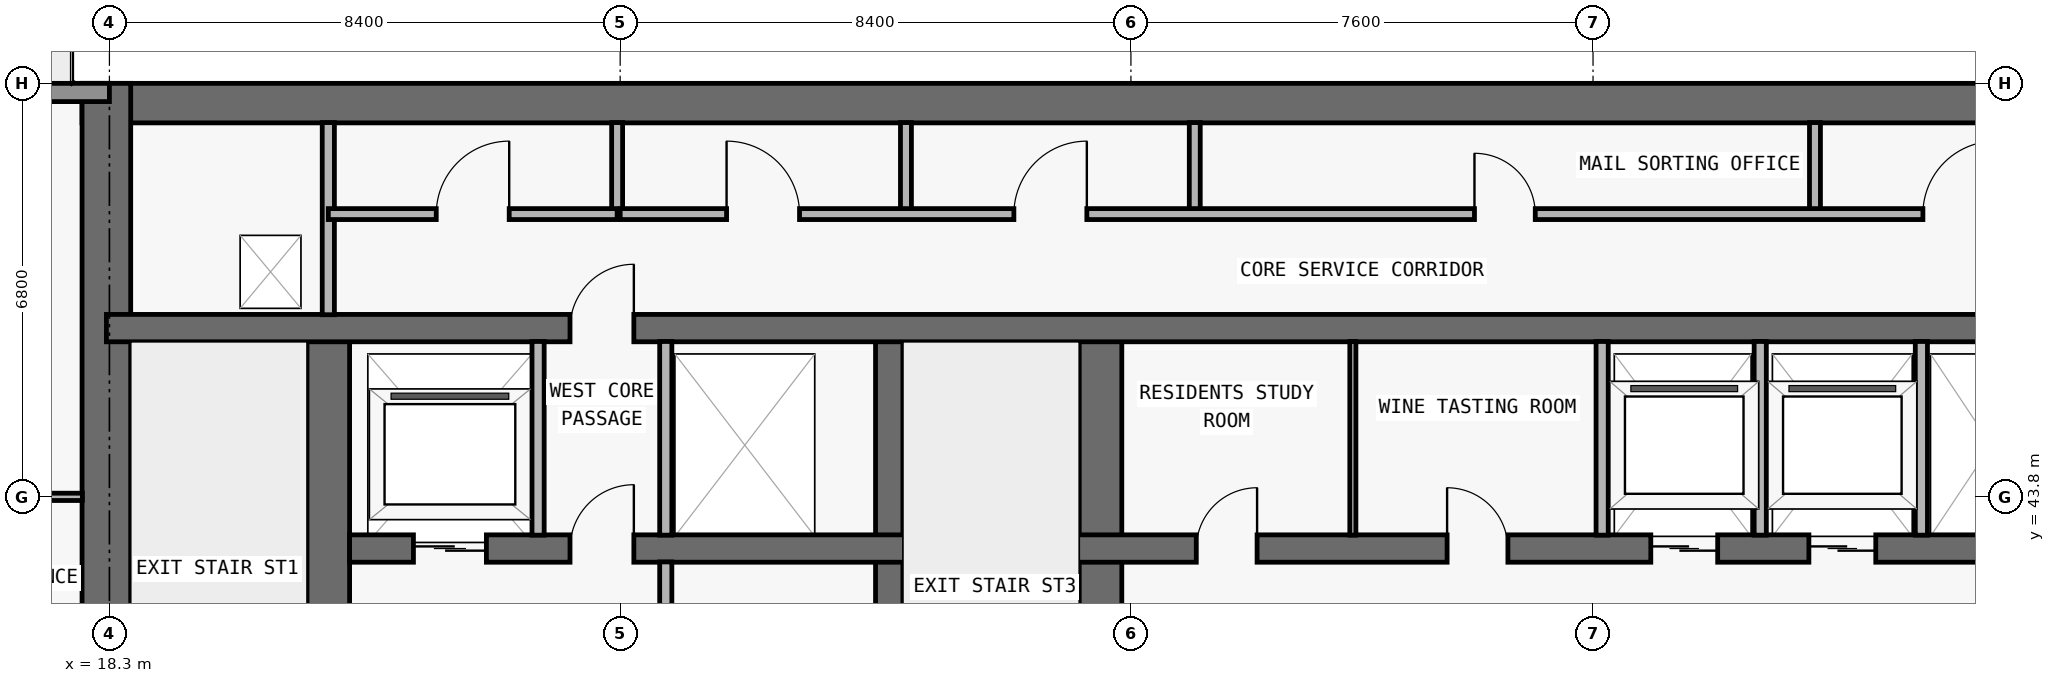
"""IFC4 building model, lengths in metres.
Left out: names, types, materials, properties, quantities, classifications, styles, units other than length and angle.
Written with IfcOpenShell. Run it as: python <this file> out.ifc"""

import sys

from ifc_helpers import new_model, si_unit, direction, frame, frame_2d, origin, place, context, subcontext, project, spatial, rectangle, extrude, element, fill, save


model = new_model("IFC4")
c1 = context("Model", 3, precision=1e-05, world=origin(), true_north=direction((0.0, 1.0)))
c2 = subcontext(c1, "Body", "Model", "MODEL_VIEW")
j1 = project(units=[si_unit("LENGTHUNIT", "METRE"), si_unit("PLANEANGLEUNIT", "RADIAN")], contexts=[c1])
p1 = place(None, origin())
s1 = spatial("IfcSite", under=j1, at=p1, CompositionType="ELEMENT")
p2 = place(p1, origin())
s2 = spatial("IfcBuilding", under=s1, at=p2, CompositionType="ELEMENT")
p3 = place(p2, frame((0.0, 0.0, 145.5)))
s3 = spatial("IfcBuildingStorey", under=s2, at=p3, CompositionType="ELEMENT", Elevation=145.5)
p4 = place(p3, frame((17.85, 50.275, 0.0), z_axis=(0.0, 0.0, 1.0), x_axis=(1.0, 0.0, 0.0)))
e1 = element("IfcWall", 1, at=p4, inside=s3, PredefinedType="SHEAR", context=c2, shape_type="SweptSolid", body=[
    extrude(rectangle(XDim=42.1, YDim=0.65, at=frame_2d((21.05, 0.0))), origin(), (0.0, 0.0, 1.0), 3.05),
])
p5 = place(p3, frame((18.25, 36.55, 0.0), z_axis=(0.0, 0.0, 1.0), x_axis=(0.0, 1.0, 0.0)))
e2 = element("IfcWall", 2, at=p5, inside=s3, PredefinedType="SHEAR", context=c2, shape_type="SweptSolid", body=[
    extrude(rectangle(XDim=14.05, YDim=0.8, at=frame_2d((7.025, 0.0))), origin(), (0.0, 0.0, 1.0), 3.05),
])
p6 = place(p3, frame((21.9, 36.95, 0.0), z_axis=(0.0, 0.0, 1.0), x_axis=(0.0, 1.0, 0.0)))
e3 = element("IfcWall", 3, at=p6, inside=s3, PredefinedType="SHEAR", context=c2, shape_type="SweptSolid", body=[
    extrude(rectangle(XDim=9.625, YDim=0.7, at=frame_2d((4.812, 0.0))), origin(), (0.0, 0.0, 1.0), 3.05),
])
p7 = place(p6, frame((0.6, 0.0, 0.0)))
e4 = element("IfcOpeningElement", 4, at=p7, cuts=e3, PredefinedType="OPENING", context=c2, shape_type="SweptSolid", body=[
    extrude(rectangle(XDim=1.1, YDim=2.15, at=frame_2d((0.55, 1.075))), frame((0.0, 0.36, 0.0), z_axis=(0.0, -1.0, 0.0), x_axis=(1.0, 0.0, 0.0)), (0.0, 0.0, 1.0), 0.72),
])
p8 = place(p3, frame((31.125, 36.95, 0.0), z_axis=(0.0, 0.0, 1.0), x_axis=(0.0, 1.0, 0.0)))
e5 = element("IfcWall", 5, at=p8, inside=s3, PredefinedType="SHEAR", context=c2, shape_type="SweptSolid", body=[
    extrude(rectangle(XDim=9.625, YDim=0.45, at=frame_2d((4.812, 0.0))), origin(), (0.0, 0.0, 1.0), 3.05),
])
p9 = place(p3, frame((34.6, 36.95, 0.0), z_axis=(0.0, 0.0, 1.0), x_axis=(0.0, 1.0, 0.0)))
e6 = element("IfcWall", 6, at=p9, inside=s3, PredefinedType="SHEAR", context=c2, shape_type="SweptSolid", body=[
    extrude(rectangle(XDim=9.625, YDim=0.7, at=frame_2d((4.812, 0.0))), origin(), (0.0, 0.0, 1.0), 3.05),
])
p10 = place(p3, frame((22.25, 42.95, 0.0), z_axis=(0.0, 0.0, 1.0), x_axis=(1.0, 0.0, 0.0)))
e7 = element("IfcWall", 7, at=p10, inside=s3, PredefinedType="SHEAR", context=c2, shape_type="SweptSolid", body=[
    extrude(rectangle(XDim=33.3, YDim=0.45, at=frame_2d((16.65, 0.0))), origin(), (0.0, 0.0, 1.0), 3.05),
])
p11 = place(p10, frame((1.05, 0.0, 0.0)))
e8 = element("IfcOpeningElement", 8, at=p11, cuts=e7, PredefinedType="OPENING", context=c2, shape_type="SweptSolid", body=[
    extrude(rectangle(XDim=1.2, YDim=2.2, at=frame_2d((0.6, 1.1))), frame((0.0, 0.235, 0.0), z_axis=(0.0, -1.0, 0.0), x_axis=(1.0, 0.0, 0.0)), (0.0, 0.0, 1.0), 0.47),
])
p12 = place(p10, frame((31.05, 0.0, 0.0)))
e9 = element("IfcOpeningElement", 9, at=p12, cuts=e7, PredefinedType="OPENING", context=c2, shape_type="SweptSolid", body=[
    extrude(rectangle(XDim=1.2, YDim=2.2, at=frame_2d((0.6, 1.1))), frame((0.0, 0.235, 0.0), z_axis=(0.0, -1.0, 0.0), x_axis=(1.0, 0.0, 0.0)), (0.0, 0.0, 1.0), 0.47),
])
p13 = place(p10, frame((21.4, 0.0, 0.0)))
e10 = element("IfcOpeningElement", 10, at=p13, cuts=e7, PredefinedType="OPENING", context=c2, shape_type="SweptSolid", body=[
    extrude(rectangle(XDim=1.1, YDim=2.2, at=frame_2d((0.55, 1.1))), frame((0.0, 0.235, 0.0), z_axis=(0.0, -1.0, 0.0), x_axis=(1.0, 0.0, 0.0)), (0.0, 0.0, 1.0), 0.47),
])
p14 = place(p10, frame((24.0, 0.0, 0.0)))
e11 = element("IfcOpeningElement", 11, at=p14, cuts=e7, PredefinedType="OPENING", context=c2, shape_type="SweptSolid", body=[
    extrude(rectangle(XDim=1.1, YDim=2.2, at=frame_2d((0.55, 1.1))), frame((0.0, 0.235, 0.0), z_axis=(0.0, -1.0, 0.0), x_axis=(1.0, 0.0, 0.0)), (0.0, 0.0, 1.0), 0.47),
])
p15 = place(p10, frame((3.625, 0.0, 0.0)))
e12 = element("IfcOpeningElement", 12, at=p15, cuts=e7, PredefinedType="OPENING", context=c2, shape_type="SweptSolid", body=[
    extrude(rectangle(XDim=1.05, YDim=2.15, at=frame_2d((0.525, 1.075))), frame((0.0, 0.235, 0.0), z_axis=(0.0, -1.0, 0.0), x_axis=(1.0, 0.0, 0.0)), (0.0, 0.0, 1.0), 0.47),
])
p16 = place(p10, frame((28.675, 0.0, 0.0)))
e13 = element("IfcOpeningElement", 13, at=p16, cuts=e7, PredefinedType="OPENING", context=c2, shape_type="SweptSolid", body=[
    extrude(rectangle(XDim=1.05, YDim=2.15, at=frame_2d((0.525, 1.075))), frame((0.0, 0.235, 0.0), z_axis=(0.0, -1.0, 0.0), x_axis=(1.0, 0.0, 0.0)), (0.0, 0.0, 1.0), 0.47),
])
p17 = place(p10, frame((13.925, 0.0, 0.0)))
e14 = element("IfcOpeningElement", 14, at=p17, cuts=e7, PredefinedType="OPENING", context=c2, shape_type="SweptSolid", body=[
    extrude(rectangle(XDim=1.0, YDim=2.2, at=frame_2d((0.5, 1.1))), frame((0.0, 0.235, 0.0), z_axis=(0.0, -1.0, 0.0), x_axis=(1.0, 0.0, 0.0)), (0.0, 0.0, 1.0), 0.47),
])
p18 = place(p10, frame((18.05, 0.0, 0.0)))
e15 = element("IfcOpeningElement", 15, at=p18, cuts=e7, PredefinedType="OPENING", context=c2, shape_type="SweptSolid", body=[
    extrude(rectangle(XDim=1.0, YDim=2.2, at=frame_2d((0.5, 1.1))), frame((0.0, 0.235, 0.0), z_axis=(0.0, -1.0, 0.0), x_axis=(1.0, 0.0, 0.0)), (0.0, 0.0, 1.0), 0.47),
])
p19 = place(p3, frame((18.25, 46.575, 0.0), z_axis=(0.0, 0.0, 1.0), x_axis=(1.0, 0.0, 0.0)))
e16 = element("IfcWall", 16, at=p19, inside=s3, PredefinedType="SHEAR", context=c2, shape_type="SweptSolid", body=[
    extrude(rectangle(XDim=41.3, YDim=0.45, at=frame_2d((20.65, 0.0))), origin(), (0.0, 0.0, 1.0), 3.05),
])
p20 = place(p19, frame((7.625, 0.0, 0.0)))
e17 = element("IfcOpeningElement", 17, at=p20, cuts=e16, PredefinedType="OPENING", context=c2, shape_type="SweptSolid", body=[
    extrude(rectangle(XDim=1.05, YDim=2.15, at=frame_2d((0.525, 1.075))), frame((0.0, 0.235, 0.0), z_axis=(0.0, -1.0, 0.0), x_axis=(1.0, 0.0, 0.0)), (0.0, 0.0, 1.0), 0.47),
])
p21 = place(p19, frame((32.675, 0.0, 0.0)))
e18 = element("IfcOpeningElement", 18, at=p21, cuts=e16, PredefinedType="OPENING", context=c2, shape_type="SweptSolid", body=[
    extrude(rectangle(XDim=1.05, YDim=2.15, at=frame_2d((0.525, 1.075))), frame((0.0, 0.235, 0.0), z_axis=(0.0, -1.0, 0.0), x_axis=(1.0, 0.0, 0.0)), (0.0, 0.0, 1.0), 0.47),
])
p22 = place(p3, frame((7.7, 50.45, 0.0), z_axis=(0.0, 0.0, 1.0), x_axis=(1.0, 0.0, 0.0)))
e19 = element("IfcWall", 19, at=p22, inside=s3, PredefinedType="STANDARD", context=c2, shape_type="SweptSolid", body=[
    extrude(rectangle(XDim=10.6, YDim=0.3, at=frame_2d((5.3, 0.0))), origin(), (0.0, 0.0, 1.0), 3.05),
])
p23 = place(p22, frame((4.3, 0.0, 0.0)))
e20 = element("IfcOpeningElement", 20, at=p23, cuts=e19, PredefinedType="OPENING", context=c2, shape_type="SweptSolid", body=[
    extrude(rectangle(XDim=2.0, YDim=2.3, at=frame_2d((1.0, 1.15))), frame((0.0, 0.16, 0.0), z_axis=(0.0, -1.0, 0.0), x_axis=(1.0, 0.0, 0.0)), (0.0, 0.0, 1.0), 0.32),
])
p24 = place(p3, frame((21.9, 46.795, 0.0), z_axis=(0.0, 0.0, 1.0), x_axis=(0.0, 1.0, 0.0)))
e21 = element("IfcWall", 21, at=p24, inside=s3, PredefinedType="PARTITIONING", context=c2, shape_type="SweptSolid", body=[
    extrude(rectangle(XDim=3.16, YDim=0.2, at=frame_2d((1.58, 0.0))), origin(), (0.0, 0.0, 1.0), 3.05),
])
p25 = place(p3, frame((25.35, 43.17, 0.0), z_axis=(0.0, 0.0, 1.0), x_axis=(0.0, 1.0, 0.0)))
e22 = element("IfcWall", 22, at=p25, inside=s3, PredefinedType="PARTITIONING", context=c2, shape_type="SweptSolid", body=[
    extrude(rectangle(XDim=3.185, YDim=0.2, at=frame_2d((1.593, 0.0))), origin(), (0.0, 0.0, 1.0), 3.05),
])
p26 = place(p3, frame((26.65, 48.45, 0.0), z_axis=(0.0, 0.0, 1.0), x_axis=(0.0, 1.0, 0.0)))
e23 = element("IfcWall", 23, at=p26, inside=s3, PredefinedType="PARTITIONING", context=c2, shape_type="SweptSolid", body=[
    extrude(rectangle(XDim=1.505, YDim=0.18, at=frame_2d((0.752, 0.0))), origin(), (0.0, 0.0, 1.0), 3.05),
])
p27 = place(p3, frame((27.45, 37.345, 0.0), z_axis=(0.0, 0.0, 1.0), x_axis=(0.0, 1.0, 0.0)))
e24 = element("IfcWall", 24, at=p27, inside=s3, PredefinedType="PARTITIONING", context=c2, shape_type="SweptSolid", body=[
    extrude(rectangle(XDim=5.385, YDim=0.2, at=frame_2d((2.692, 0.0))), origin(), (0.0, 0.0, 1.0), 3.05),
])
p28 = place(p3, frame((27.45, 43.17, 0.0), z_axis=(0.0, 0.0, 1.0), x_axis=(0.0, 1.0, 0.0)))
e25 = element("IfcWall", 25, at=p28, inside=s3, PredefinedType="PARTITIONING", context=c2, shape_type="SweptSolid", body=[
    extrude(rectangle(XDim=3.185, YDim=0.2, at=frame_2d((1.593, 0.0))), origin(), (0.0, 0.0, 1.0), 3.05),
])
for number, where, z_axis, x_axis in (
    (26, (31.4, 48.45, 0.0), (0.0, 0.0, 1.0), (0.0, 1.0, 0.0)),
    (27, (36.15, 48.45, 0.0), (0.0, 0.0, 1.0), (0.0, 1.0, 0.0)),
):
    element("IfcWall", number, at=place(p3, frame(where, z_axis=z_axis, x_axis=x_axis)), inside=s3, PredefinedType="PARTITIONING", context=c2, shape_type="SweptSolid", body=[
        extrude(rectangle(XDim=1.505, YDim=0.18, at=frame_2d((0.752, 0.0))), origin(), (0.0, 0.0, 1.0), 3.05),
    ])
p29 = place(p3, frame((38.75, 43.17, 0.0), z_axis=(0.0, 0.0, 1.0), x_axis=(0.0, 1.0, 0.0)))
e28 = element("IfcWall", 28, at=p29, inside=s3, PredefinedType="MOVABLE", context=c2, shape_type="SweptSolid", body=[
    extrude(rectangle(XDim=3.185, YDim=0.1, at=frame_2d((1.593, 0.0))), origin(), (0.0, 0.0, 1.0), 3.05),
])
for number, where, z_axis, x_axis in (
    (29, (42.85, 43.17, 0.0), (0.0, 0.0, 1.0), (0.0, 1.0, 0.0)),
    (30, (45.45, 43.17, 0.0), (0.0, 0.0, 1.0), (0.0, 1.0, 0.0)),
):
    element("IfcWall", number, at=place(p3, frame(where, z_axis=z_axis, x_axis=x_axis)), inside=s3, PredefinedType="PARTITIONING", context=c2, shape_type="SweptSolid", body=[
        extrude(rectangle(XDim=3.185, YDim=0.2, at=frame_2d((1.593, 0.0))), origin(), (0.0, 0.0, 1.0), 3.05),
    ])
p30 = place(p3, frame((46.35, 48.45, 0.0), z_axis=(0.0, 0.0, 1.0), x_axis=(0.0, 1.0, 0.0)))
e31 = element("IfcWall", 31, at=p30, inside=s3, PredefinedType="PARTITIONING", context=c2, shape_type="SweptSolid", body=[
    extrude(rectangle(XDim=1.505, YDim=0.18, at=frame_2d((0.752, 0.0))), origin(), (0.0, 0.0, 1.0), 3.05),
])
p31 = place(p3, frame((48.1, 43.17, 0.0), z_axis=(0.0, 0.0, 1.0), x_axis=(0.0, 1.0, 0.0)))
e32 = element("IfcWall", 32, at=p31, inside=s3, PredefinedType="PARTITIONING", context=c2, shape_type="SweptSolid", body=[
    extrude(rectangle(XDim=3.185, YDim=0.2, at=frame_2d((1.593, 0.0))), origin(), (0.0, 0.0, 1.0), 3.05),
])
p32 = place(p3, frame((4.195, 43.8, 0.0), z_axis=(0.0, 0.0, 1.0), x_axis=(1.0, 0.0, 0.0)))
e33 = element("IfcWall", 33, at=p32, inside=s3, PredefinedType="PARTITIONING", context=c2, shape_type="SweptSolid", body=[
    extrude(rectangle(XDim=13.66, YDim=0.12, at=frame_2d((6.83, 0.0))), origin(), (0.0, 0.0, 1.0), 2.339),
])
p33 = place(p32, frame((8.743, 0.0, 0.0)))
e34 = element("IfcOpeningElement", 34, at=p33, cuts=e33, PredefinedType="OPENING", context=c2, shape_type="SweptSolid", body=[
    extrude(rectangle(XDim=0.9, YDim=2.15, at=frame_2d((0.45, 1.075))), frame((0.0, 0.07, 0.0), z_axis=(0.0, -1.0, 0.0), x_axis=(1.0, 0.0, 0.0)), (0.0, 0.0, 1.0), 0.14),
])
p34 = place(p32, frame((12.107, 0.0, 0.0)))
e35 = element("IfcOpeningElement", 35, at=p34, cuts=e33, PredefinedType="OPENING", context=c2, shape_type="SweptSolid", body=[
    extrude(rectangle(XDim=0.85, YDim=2.1, at=frame_2d((0.425, 1.05))), frame((0.0, 0.07, 0.0), z_axis=(0.0, -1.0, 0.0), x_axis=(1.0, 0.0, 0.0)), (0.0, 0.0, 1.0), 0.14),
])
p35 = place(p3, frame((21.9, 48.45, 0.0), z_axis=(0.0, 0.0, 1.0), x_axis=(1.0, 0.0, 0.0)))
e36 = element("IfcWall", 36, at=p35, inside=s3, PredefinedType="PARTITIONING", context=c2, shape_type="SweptSolid", body=[
    extrude(rectangle(XDim=4.75, YDim=0.18, at=frame_2d((2.375, 0.0))), origin(), (0.0, 0.0, 1.0), 3.05),
])
p36 = place(p35, frame((1.775, 0.0, 0.0)))
e37 = element("IfcOpeningElement", 37, at=p36, cuts=e36, PredefinedType="OPENING", context=c2, shape_type="SweptSolid", body=[
    extrude(rectangle(XDim=1.2, YDim=2.2, at=frame_2d((0.6, 1.1))), frame((0.0, 0.1, 0.0), z_axis=(0.0, -1.0, 0.0), x_axis=(1.0, 0.0, 0.0)), (0.0, 0.0, 1.0), 0.2),
])
p37 = place(p3, frame((26.7, 48.45, 0.0), z_axis=(0.0, 0.0, 1.0), x_axis=(1.0, 0.0, 0.0)))
e38 = element("IfcWall", 38, at=p37, inside=s3, PredefinedType="PARTITIONING", context=c2, shape_type="SweptSolid", body=[
    extrude(rectangle(XDim=29.2, YDim=0.18, at=frame_2d((14.6, 0.0))), origin(), (0.0, 0.0, 1.0), 3.05),
])
p38 = place(p37, frame((1.75, 0.0, 0.0)))
e39 = element("IfcOpeningElement", 39, at=p38, cuts=e38, PredefinedType="OPENING", context=c2, shape_type="SweptSolid", body=[
    extrude(rectangle(XDim=1.2, YDim=2.2, at=frame_2d((0.6, 1.1))), frame((0.0, 0.1, 0.0), z_axis=(0.0, -1.0, 0.0), x_axis=(1.0, 0.0, 0.0)), (0.0, 0.0, 1.0), 0.2),
])
p39 = place(p37, frame((6.475, 0.0, 0.0)))
e40 = element("IfcOpeningElement", 40, at=p39, cuts=e38, PredefinedType="OPENING", context=c2, shape_type="SweptSolid", body=[
    extrude(rectangle(XDim=1.2, YDim=2.2, at=frame_2d((0.6, 1.1))), frame((0.0, 0.1, 0.0), z_axis=(0.0, -1.0, 0.0), x_axis=(1.0, 0.0, 0.0)), (0.0, 0.0, 1.0), 0.2),
])
p40 = place(p37, frame((14.05, 0.0, 0.0)))
e41 = element("IfcOpeningElement", 41, at=p40, cuts=e38, PredefinedType="OPENING", context=c2, shape_type="SweptSolid", body=[
    extrude(rectangle(XDim=1.0, YDim=2.2, at=frame_2d((0.5, 1.1))), frame((0.0, 0.1, 0.0), z_axis=(0.0, -1.0, 0.0), x_axis=(1.0, 0.0, 0.0)), (0.0, 0.0, 1.0), 0.2),
])
p41 = place(p37, frame((21.425, 0.0, 0.0)))
e42 = element("IfcOpeningElement", 42, at=p41, cuts=e38, PredefinedType="OPENING", context=c2, shape_type="SweptSolid", body=[
    extrude(rectangle(XDim=1.2, YDim=2.2, at=frame_2d((0.6, 1.1))), frame((0.0, 0.1, 0.0), z_axis=(0.0, -1.0, 0.0), x_axis=(1.0, 0.0, 0.0)), (0.0, 0.0, 1.0), 0.2),
])
p42 = place(p37, frame((26.375, 0.0, 0.0)))
e43 = element("IfcOpeningElement", 43, at=p42, cuts=e38, PredefinedType="OPENING", context=c2, shape_type="SweptSolid", body=[
    extrude(rectangle(XDim=0.85, YDim=2.1, at=frame_2d((0.425, 1.05))), frame((0.0, 0.1, 0.0), z_axis=(0.0, -1.0, 0.0), x_axis=(1.0, 0.0, 0.0)), (0.0, 0.0, 1.0), 0.2),
])
p43 = place(p11, origin())
e44 = element("IfcDoor", 44, at=p43, inside=s3, OperationType="DOUBLE_DOOR_SLIDING", PredefinedType="DOOR", context=c2, shape_type="SweptSolid", body=[
    extrude(rectangle(XDim=1.2, YDim=2.2, at=frame_2d((0.6, 1.1))), frame((0.0, 0.025, 0.0), z_axis=(0.0, -1.0, 0.0), x_axis=(1.0, 0.0, 0.0)), (0.0, 0.0, 1.0), 0.05),
])
fill(e8, e44)
p44 = place(p13, origin())
e45 = element("IfcDoor", 45, at=p44, inside=s3, OperationType="DOUBLE_DOOR_SLIDING", PredefinedType="DOOR", context=c2, shape_type="SweptSolid", body=[
    extrude(rectangle(XDim=1.1, YDim=2.2, at=frame_2d((0.55, 1.1))), frame((0.0, 0.025, 0.0), z_axis=(0.0, -1.0, 0.0), x_axis=(1.0, 0.0, 0.0)), (0.0, 0.0, 1.0), 0.05),
])
fill(e10, e45)
p45 = place(p14, origin())
e46 = element("IfcDoor", 46, at=p45, inside=s3, OperationType="DOUBLE_DOOR_SLIDING", PredefinedType="DOOR", context=c2, shape_type="SweptSolid", body=[
    extrude(rectangle(XDim=1.1, YDim=2.2, at=frame_2d((0.55, 1.1))), frame((0.0, 0.025, 0.0), z_axis=(0.0, -1.0, 0.0), x_axis=(1.0, 0.0, 0.0)), (0.0, 0.0, 1.0), 0.05),
])
fill(e11, e46)
p46 = place(p15, origin())
e47 = element("IfcDoor", 47, at=p46, inside=s3, OperationType="SINGLE_SWING_RIGHT", PredefinedType="DOOR", context=c2, shape_type="SweptSolid", body=[
    extrude(rectangle(XDim=1.05, YDim=2.15, at=frame_2d((0.525, 1.075))), frame((0.0, 0.025, 0.0), z_axis=(0.0, -1.0, 0.0), x_axis=(1.0, 0.0, 0.0)), (0.0, 0.0, 1.0), 0.05),
])
fill(e12, e47)
p47 = place(p17, origin())
e48 = element("IfcDoor", 48, at=p47, inside=s3, OperationType="SINGLE_SWING_RIGHT", PredefinedType="DOOR", context=c2, shape_type="SweptSolid", body=[
    extrude(rectangle(XDim=1.0, YDim=2.2, at=frame_2d((0.5, 1.1))), frame((0.0, 0.025, 0.0), z_axis=(0.0, -1.0, 0.0), x_axis=(1.0, 0.0, 0.0)), (0.0, 0.0, 1.0), 0.05),
])
fill(e14, e48)
p48 = place(p18, origin())
e49 = element("IfcDoor", 49, at=p48, inside=s3, OperationType="SINGLE_SWING_LEFT", PredefinedType="DOOR", context=c2, shape_type="SweptSolid", body=[
    extrude(rectangle(XDim=1.0, YDim=2.2, at=frame_2d((0.5, 1.1))), frame((0.0, 0.025, 0.0), z_axis=(0.0, -1.0, 0.0), x_axis=(1.0, 0.0, 0.0)), (0.0, 0.0, 1.0), 0.05),
])
fill(e15, e49)
p49 = place(p20, origin())
e50 = element("IfcDoor", 50, at=p49, inside=s3, OperationType="SINGLE_SWING_RIGHT", PredefinedType="DOOR", context=c2, shape_type="SweptSolid", body=[
    extrude(rectangle(XDim=1.05, YDim=2.15, at=frame_2d((0.525, 1.075))), frame((0.0, 0.025, 0.0), z_axis=(0.0, -1.0, 0.0), x_axis=(1.0, 0.0, 0.0)), (0.0, 0.0, 1.0), 0.05),
])
fill(e17, e50)
p50 = place(p36, origin())
e51 = element("IfcDoor", 51, at=p50, inside=s3, OperationType="SINGLE_SWING_RIGHT", PredefinedType="DOOR", context=c2, shape_type="SweptSolid", body=[
    extrude(rectangle(XDim=1.2, YDim=2.2, at=frame_2d((0.6, 1.1))), frame((0.0, 0.025, 0.0), z_axis=(0.0, -1.0, 0.0), x_axis=(1.0, 0.0, 0.0)), (0.0, 0.0, 1.0), 0.05),
])
fill(e37, e51)
p51 = place(p38, origin())
e52 = element("IfcDoor", 52, at=p51, inside=s3, OperationType="SINGLE_SWING_LEFT", PredefinedType="DOOR", context=c2, shape_type="SweptSolid", body=[
    extrude(rectangle(XDim=1.2, YDim=2.2, at=frame_2d((0.6, 1.1))), frame((0.0, 0.025, 0.0), z_axis=(0.0, -1.0, 0.0), x_axis=(1.0, 0.0, 0.0)), (0.0, 0.0, 1.0), 0.05),
])
fill(e39, e52)
p52 = place(p39, origin())
e53 = element("IfcDoor", 53, at=p52, inside=s3, OperationType="SINGLE_SWING_RIGHT", PredefinedType="DOOR", context=c2, shape_type="SweptSolid", body=[
    extrude(rectangle(XDim=1.2, YDim=2.2, at=frame_2d((0.6, 1.1))), frame((0.0, 0.025, 0.0), z_axis=(0.0, -1.0, 0.0), x_axis=(1.0, 0.0, 0.0)), (0.0, 0.0, 1.0), 0.05),
])
fill(e40, e53)
p53 = place(p40, origin())
e54 = element("IfcDoor", 54, at=p53, inside=s3, OperationType="SINGLE_SWING_LEFT", PredefinedType="DOOR", context=c2, shape_type="SweptSolid", body=[
    extrude(rectangle(XDim=1.0, YDim=2.2, at=frame_2d((0.5, 1.1))), frame((0.0, 0.025, 0.0), z_axis=(0.0, -1.0, 0.0), x_axis=(1.0, 0.0, 0.0)), (0.0, 0.0, 1.0), 0.05),
])
fill(e41, e54)
p54 = place(p41, origin())
e55 = element("IfcDoor", 55, at=p54, inside=s3, OperationType="SINGLE_SWING_RIGHT", PredefinedType="DOOR", context=c2, shape_type="SweptSolid", body=[
    extrude(rectangle(XDim=1.2, YDim=2.2, at=frame_2d((0.6, 1.1))), frame((0.0, 0.025, 0.0), z_axis=(0.0, -1.0, 0.0), x_axis=(1.0, 0.0, 0.0)), (0.0, 0.0, 1.0), 0.05),
])
fill(e42, e55)
save(model, sys.argv[1])
